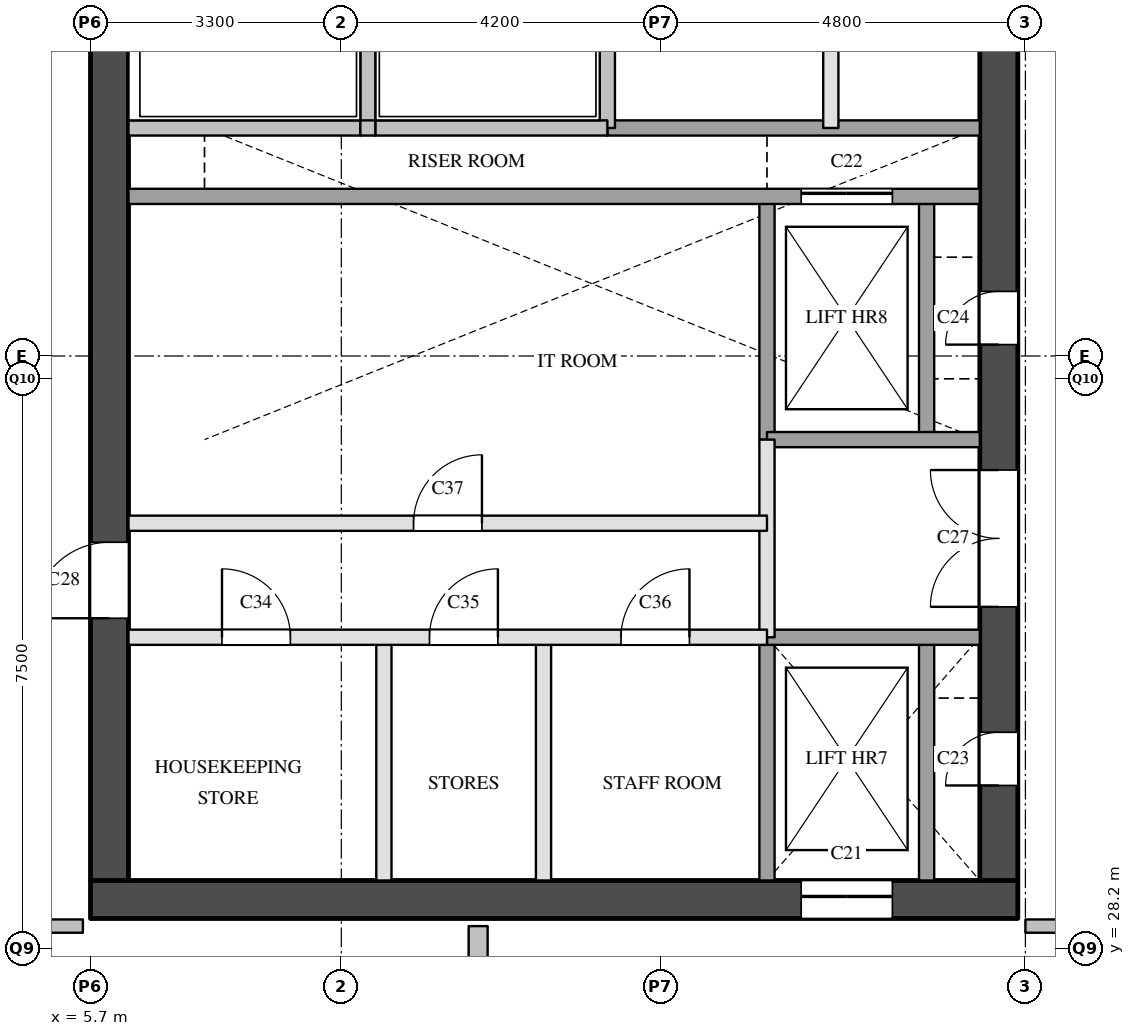
"""IFC4 building model, lengths in metres.
Left out: names, types, materials, properties, quantities, classifications, styles, units other than length and angle.
Written with IfcOpenShell. Run it as: python <this file> out.ifc"""

import sys

from ifc_helpers import new_model, si_unit, direction, frame, frame_2d, origin, place, context, subcontext, project, spatial, rectangle, extrude, element, fill, save


model = new_model("IFC4")
c1 = context("Model", 3, precision=1e-05, world=origin(), true_north=direction((0.0, 1.0)))
c2 = subcontext(c1, "Body", "Model", "MODEL_VIEW")
j1 = project(units=[si_unit("LENGTHUNIT", "METRE"), si_unit("PLANEANGLEUNIT", "RADIAN")], contexts=[c1])
p1 = place(None, origin())
s1 = spatial("IfcSite", under=j1, at=p1, CompositionType="ELEMENT")
p2 = place(p1, origin())
s2 = spatial("IfcBuilding", under=s1, at=p2, CompositionType="ELEMENT")
p3 = place(p2, frame((0.0, 0.0, 162.2)))
s3 = spatial("IfcBuildingStorey", under=s2, at=p3, CompositionType="ELEMENT", Elevation=162.2)
p4 = place(p3, frame((5.7, 28.85, 0.0), z_axis=(0.0, 0.0, 1.0), x_axis=(1.0, 0.0, 0.0)))
e1 = element("IfcWall", 1, at=p4, inside=s3, PredefinedType="SHEAR", context=c2, shape_type="SweptSolid", body=[
    extrude(rectangle(XDim=12.2, YDim=0.5, at=frame_2d((6.1, 0.0))), origin(), (0.0, 0.0, 1.0), 3.6),
])
p5 = place(p4, frame((9.35, 0.0, 0.0)))
e2 = element("IfcOpeningElement", 2, at=p5, cuts=e1, PredefinedType="OPENING", context=c2, shape_type="SweptSolid", body=[
    extrude(rectangle(XDim=1.2, YDim=2.1, at=frame_2d((0.6, 1.05))), frame((0.0, 0.26, 0.0), z_axis=(0.0, -1.0, 0.0), x_axis=(1.0, 0.0, 0.0)), (0.0, 0.0, 1.0), 0.52),
])
p6 = place(p3, frame((5.95, 29.1, 0.0), z_axis=(0.0, 0.0, 1.0), x_axis=(0.0, 1.0, 0.0)))
e3 = element("IfcWall", 3, at=p6, inside=s3, PredefinedType="SHEAR", context=c2, shape_type="SweptSolid", body=[
    extrude(rectangle(XDim=20.3, YDim=0.5, at=frame_2d((10.15, 0.0))), origin(), (0.0, 0.0, 1.0), 3.6),
])
p7 = place(p6, frame((3.45, 0.0, 0.0)))
e4 = element("IfcOpeningElement", 4, at=p7, cuts=e3, PredefinedType="OPENING", context=c2, shape_type="SweptSolid", body=[
    extrude(rectangle(XDim=1.0, YDim=2.1, at=frame_2d((0.5, 1.05))), frame((0.0, 0.26, 0.0), z_axis=(0.0, -1.0, 0.0), x_axis=(1.0, 0.0, 0.0)), (0.0, 0.0, 1.0), 0.52),
])
p8 = place(p6, frame((16.4, 0.0, 0.0)))
e5 = element("IfcOpeningElement", 5, at=p8, cuts=e3, PredefinedType="OPENING", context=c2, shape_type="SweptSolid", body=[
    extrude(rectangle(XDim=1.0, YDim=2.1, at=frame_2d((0.5, 1.05))), frame((0.0, 0.26, 0.0), z_axis=(0.0, -1.0, 0.0), x_axis=(1.0, 0.0, 0.0)), (0.0, 0.0, 1.0), 0.52),
])
p9 = place(p3, frame((17.65, 29.1, 0.0), z_axis=(0.0, 0.0, 1.0), x_axis=(0.0, 1.0, 0.0)))
e6 = element("IfcWall", 6, at=p9, inside=s3, PredefinedType="SHEAR", context=c2, shape_type="SweptSolid", body=[
    extrude(rectangle(XDim=20.3, YDim=0.5, at=frame_2d((10.15, 0.0))), origin(), (0.0, 0.0, 1.0), 3.6),
])
p10 = place(p9, frame((1.25, 0.0, 0.0)))
e7 = element("IfcOpeningElement", 7, at=p10, cuts=e6, PredefinedType="OPENING", context=c2, shape_type="SweptSolid", body=[
    extrude(rectangle(XDim=0.7, YDim=2.1, at=frame_2d((0.35, 1.05))), frame((0.0, 0.26, 0.0), z_axis=(0.0, -1.0, 0.0), x_axis=(1.0, 0.0, 0.0)), (0.0, 0.0, 1.0), 0.52),
])
p11 = place(p9, frame((7.05, 0.0, 0.0)))
e8 = element("IfcOpeningElement", 8, at=p11, cuts=e6, PredefinedType="OPENING", context=c2, shape_type="SweptSolid", body=[
    extrude(rectangle(XDim=0.7, YDim=2.1, at=frame_2d((0.35, 1.05))), frame((0.0, 0.26, 0.0), z_axis=(0.0, -1.0, 0.0), x_axis=(1.0, 0.0, 0.0)), (0.0, 0.0, 1.0), 0.52),
])
p12 = place(p9, frame((3.6, 0.0, 0.0)))
e9 = element("IfcOpeningElement", 9, at=p12, cuts=e6, PredefinedType="OPENING", context=c2, shape_type="SweptSolid", body=[
    extrude(rectangle(XDim=1.8, YDim=2.1, at=frame_2d((0.9, 1.05))), frame((0.0, 0.26, 0.0), z_axis=(0.0, -1.0, 0.0), x_axis=(1.0, 0.0, 0.0)), (0.0, 0.0, 1.0), 0.52),
])
p13 = place(p3, frame((9.35, 39.0, 0.0), z_axis=(0.0, 0.0, 1.0), x_axis=(0.0, 1.0, 0.0)))
e10 = element("IfcWall", 10, at=p13, inside=s3, PredefinedType="SOLIDWALL", context=c2, shape_type="SweptSolid", body=[
    extrude(rectangle(XDim=1.9, YDim=0.2, at=frame_2d((0.95, 0.0))), origin(), (0.0, 0.0, 1.0), 3.6),
])
for number, where, z_axis, x_axis in (
    (11, (9.56, 29.1, 0.0), (0.0, 0.0, 1.0), (0.0, 1.0, 0.0)),
    (12, (11.66, 29.1, 0.0), (0.0, 0.0, 1.0), (0.0, 1.0, 0.0)),
):
    element("IfcWall", number, at=place(p3, frame(where, z_axis=z_axis, x_axis=x_axis)), inside=s3, PredefinedType="PARTITIONING", context=c2, shape_type="SweptSolid", body=[
        extrude(rectangle(XDim=3.2, YDim=0.2, at=frame_2d((1.6, 0.0))), origin(), (0.0, 0.0, 1.0), 3.6),
    ])
p14 = place(p3, frame((12.5, 39.0, 0.0), z_axis=(0.0, 0.0, 1.0), x_axis=(0.0, 1.0, 0.0)))
e13 = element("IfcWall", 13, at=p14, inside=s3, PredefinedType="SOLIDWALL", context=c2, shape_type="SweptSolid", body=[
    extrude(rectangle(XDim=1.9, YDim=0.2, at=frame_2d((0.95, 0.0))), origin(), (0.0, 0.0, 1.0), 3.6),
])
p15 = place(p3, frame((14.6, 32.3, 0.0), z_axis=(0.0, 0.0, 1.0), x_axis=(0.0, 1.0, 0.0)))
e14 = element("IfcWall", 14, at=p15, inside=s3, PredefinedType="PARTITIONING", context=c2, shape_type="SweptSolid", body=[
    extrude(rectangle(XDim=2.6, YDim=0.2, at=frame_2d((1.3, 0.0))), origin(), (0.0, 0.0, 1.0), 3.6),
])
p16 = place(p3, frame((14.6, 29.1, 0.0), z_axis=(0.0, 0.0, 1.0), x_axis=(0.0, 1.0, 0.0)))
e15 = element("IfcWall", 15, at=p16, inside=s3, PredefinedType="SOLIDWALL", context=c2, shape_type="SweptSolid", body=[
    extrude(rectangle(XDim=3.2, YDim=0.2, at=frame_2d((1.6, 0.0))), origin(), (0.0, 0.0, 1.0), 3.6),
])
p17 = place(p3, frame((14.6, 34.9, 0.0), z_axis=(0.0, 0.0, 1.0), x_axis=(0.0, 1.0, 0.0)))
e16 = element("IfcWall", 16, at=p17, inside=s3, PredefinedType="SOLIDWALL", context=c2, shape_type="SweptSolid", body=[
    extrude(rectangle(XDim=3.2, YDim=0.2, at=frame_2d((1.6, 0.0))), origin(), (0.0, 0.0, 1.0), 3.6),
])
p18 = place(p3, frame((15.44, 39.0, 0.0), z_axis=(0.0, 0.0, 1.0), x_axis=(0.0, 1.0, 0.0)))
e17 = element("IfcWall", 17, at=p18, inside=s3, PredefinedType="PARTITIONING", context=c2, shape_type="SweptSolid", body=[
    extrude(rectangle(XDim=6.2, YDim=0.2, at=frame_2d((3.1, 0.0))), origin(), (0.0, 0.0, 1.0), 3.6),
])
p19 = place(p3, frame((16.7, 29.1, 0.0), z_axis=(0.0, 0.0, 1.0), x_axis=(0.0, 1.0, 0.0)))
e18 = element("IfcWall", 18, at=p19, inside=s3, PredefinedType="SOLIDWALL", context=c2, shape_type="SweptSolid", body=[
    extrude(rectangle(XDim=3.2, YDim=0.2, at=frame_2d((1.6, 0.0))), origin(), (0.0, 0.0, 1.0), 3.6),
])
p20 = place(p3, frame((16.7, 34.9, 0.0), z_axis=(0.0, 0.0, 1.0), x_axis=(0.0, 1.0, 0.0)))
e19 = element("IfcWall", 19, at=p20, inside=s3, PredefinedType="SOLIDWALL", context=c2, shape_type="SweptSolid", body=[
    extrude(rectangle(XDim=3.2, YDim=0.2, at=frame_2d((1.6, 0.0))), origin(), (0.0, 0.0, 1.0), 3.6),
])
p21 = place(p3, frame((6.2, 32.3, 0.0), z_axis=(0.0, 0.0, 1.0), x_axis=(1.0, 0.0, 0.0)))
e20 = element("IfcWall", 20, at=p21, inside=s3, PredefinedType="PARTITIONING", context=c2, shape_type="SweptSolid", body=[
    extrude(rectangle(XDim=8.4, YDim=0.2, at=frame_2d((4.2, 0.0))), origin(), (0.0, 0.0, 1.0), 3.6),
])
p22 = place(p21, frame((1.23, 0.0, 0.0)))
e21 = element("IfcOpeningElement", 21, at=p22, cuts=e20, PredefinedType="OPENING", context=c2, shape_type="SweptSolid", body=[
    extrude(rectangle(XDim=0.9, YDim=2.1, at=frame_2d((0.45, 1.05))), frame((0.0, 0.11, 0.0), z_axis=(0.0, -1.0, 0.0), x_axis=(1.0, 0.0, 0.0)), (0.0, 0.0, 1.0), 0.22),
])
p23 = place(p21, frame((3.96, 0.0, 0.0)))
e22 = element("IfcOpeningElement", 22, at=p23, cuts=e20, PredefinedType="OPENING", context=c2, shape_type="SweptSolid", body=[
    extrude(rectangle(XDim=0.9, YDim=2.1, at=frame_2d((0.45, 1.05))), frame((0.0, 0.11, 0.0), z_axis=(0.0, -1.0, 0.0), x_axis=(1.0, 0.0, 0.0)), (0.0, 0.0, 1.0), 0.22),
])
p24 = place(p21, frame((6.48, 0.0, 0.0)))
e23 = element("IfcOpeningElement", 23, at=p24, cuts=e20, PredefinedType="OPENING", context=c2, shape_type="SweptSolid", body=[
    extrude(rectangle(XDim=0.9, YDim=2.1, at=frame_2d((0.45, 1.05))), frame((0.0, 0.11, 0.0), z_axis=(0.0, -1.0, 0.0), x_axis=(1.0, 0.0, 0.0)), (0.0, 0.0, 1.0), 0.22),
])
p25 = place(p3, frame((14.6, 32.3, 0.0), z_axis=(0.0, 0.0, 1.0), x_axis=(1.0, 0.0, 0.0)))
e24 = element("IfcWall", 24, at=p25, inside=s3, PredefinedType="SOLIDWALL", context=c2, shape_type="SweptSolid", body=[
    extrude(rectangle(XDim=2.8, YDim=0.2, at=frame_2d((1.4, 0.0))), origin(), (0.0, 0.0, 1.0), 3.6),
])
p26 = place(p3, frame((6.2, 33.8, 0.0), z_axis=(0.0, 0.0, 1.0), x_axis=(1.0, 0.0, 0.0)))
e25 = element("IfcWall", 25, at=p26, inside=s3, PredefinedType="PARTITIONING", context=c2, shape_type="SweptSolid", body=[
    extrude(rectangle(XDim=8.4, YDim=0.2, at=frame_2d((4.2, 0.0))), origin(), (0.0, 0.0, 1.0), 3.6),
])
p27 = place(p26, frame((3.75, 0.0, 0.0)))
e26 = element("IfcOpeningElement", 26, at=p27, cuts=e25, PredefinedType="OPENING", context=c2, shape_type="SweptSolid", body=[
    extrude(rectangle(XDim=0.9, YDim=2.1, at=frame_2d((0.45, 1.05))), frame((0.0, 0.11, 0.0), z_axis=(0.0, -1.0, 0.0), x_axis=(1.0, 0.0, 0.0)), (0.0, 0.0, 1.0), 0.22),
])
p28 = place(p3, frame((14.6, 34.9, 0.0), z_axis=(0.0, 0.0, 1.0), x_axis=(1.0, 0.0, 0.0)))
e27 = element("IfcWall", 27, at=p28, inside=s3, PredefinedType="SOLIDWALL", context=c2, shape_type="SweptSolid", body=[
    extrude(rectangle(XDim=2.8, YDim=0.2, at=frame_2d((1.4, 0.0))), origin(), (0.0, 0.0, 1.0), 3.6),
])
p29 = place(p3, frame((6.2, 38.1, 0.0), z_axis=(0.0, 0.0, 1.0), x_axis=(1.0, 0.0, 0.0)))
e28 = element("IfcWall", 28, at=p29, inside=s3, PredefinedType="SOLIDWALL", context=c2, shape_type="SweptSolid", body=[
    extrude(rectangle(XDim=11.2, YDim=0.2, at=frame_2d((5.6, 0.0))), origin(), (0.0, 0.0, 1.0), 3.6),
])
p30 = place(p29, frame((8.85, 0.0, 0.0)))
e29 = element("IfcOpeningElement", 29, at=p30, cuts=e28, PredefinedType="OPENING", context=c2, shape_type="SweptSolid", body=[
    extrude(rectangle(XDim=1.2, YDim=2.1, at=frame_2d((0.6, 1.05))), frame((0.0, 0.11, 0.0), z_axis=(0.0, -1.0, 0.0), x_axis=(1.0, 0.0, 0.0)), (0.0, 0.0, 1.0), 0.22),
])
p31 = place(p3, frame((12.5, 39.0, 0.0), z_axis=(0.0, 0.0, 1.0), x_axis=(1.0, 0.0, 0.0)))
e30 = element("IfcWall", 30, at=p31, inside=s3, PredefinedType="SOLIDWALL", context=c2, shape_type="SweptSolid", body=[
    extrude(rectangle(XDim=4.9, YDim=0.2, at=frame_2d((2.45, 0.0))), origin(), (0.0, 0.0, 1.0), 3.6),
])
p32 = place(p3, frame((6.2, 39.0, 0.0), z_axis=(0.0, 0.0, 1.0), x_axis=(1.0, 0.0, 0.0)))
e31 = element("IfcWall", 31, at=p32, inside=s3, PredefinedType="SOLIDWALL", context=c2, shape_type="SweptSolid", body=[
    extrude(rectangle(XDim=3.05, YDim=0.2, at=frame_2d((1.525, 0.0))), origin(), (0.0, 0.0, 1.0), 3.6),
])
p33 = place(p3, frame((9.25, 39.0, 0.0), z_axis=(0.0, 0.0, 1.0), x_axis=(1.0, 0.0, 0.0)))
e32 = element("IfcWall", 32, at=p33, inside=s3, PredefinedType="SOLIDWALL", context=c2, shape_type="SweptSolid", body=[
    extrude(rectangle(XDim=0.2, YDim=0.2, at=frame_2d((0.1, 0.0))), origin(), (0.0, 0.0, 1.0), 3.6),
])
p34 = place(p3, frame((9.45, 39.0, 0.0), z_axis=(0.0, 0.0, 1.0), x_axis=(1.0, 0.0, 0.0)))
e33 = element("IfcWall", 33, at=p34, inside=s3, PredefinedType="SOLIDWALL", context=c2, shape_type="SweptSolid", body=[
    extrude(rectangle(XDim=3.05, YDim=0.2, at=frame_2d((1.525, 0.0))), origin(), (0.0, 0.0, 1.0), 3.6),
])
for number, where, z_axis, x_axis in (
    (34, (4.1, 28.5, 0.0), (0.0, 0.0, 1.0), (1.0, 0.0, 0.0)),
    (35, (18.0, 28.5, 0.0), (0.0, 0.0, 1.0), (1.0, 0.0, 0.0)),
):
    element("IfcWall", number, at=place(p3, frame(where, z_axis=z_axis, x_axis=x_axis)), inside=s3, PredefinedType="PARTITIONING", context=c2, shape_type="SweptSolid", body=[
        extrude(rectangle(XDim=1.5, YDim=0.175, at=frame_2d((0.75, 0.0))), origin(), (0.0, 0.0, 1.0), 3.6),
    ])
p35 = place(p3, frame((10.8, 27.0, 0.0), z_axis=(0.0, 0.0, 1.0), x_axis=(0.0, 1.0, 0.0)))
e36 = element("IfcWall", 36, at=p35, inside=s3, PredefinedType="PARTITIONING", context=c2, shape_type="SweptSolid", body=[
    extrude(rectangle(XDim=1.5, YDim=0.25, at=frame_2d((0.75, 0.0))), origin(), (0.0, 0.0, 1.0), 2.6),
])
p36 = place(p5, origin())
e37 = element("IfcDoor", 37, at=p36, inside=s3, OperationType="SLIDING_TO_LEFT", PredefinedType="DOOR", context=c2, shape_type="SweptSolid", body=[
    extrude(rectangle(XDim=1.2, YDim=2.1, at=frame_2d((0.6, 1.05))), frame((0.0, 0.025, 0.0), z_axis=(0.0, -1.0, 0.0), x_axis=(1.0, 0.0, 0.0)), (0.0, 0.0, 1.0), 0.05),
])
fill(e2, e37)
p37 = place(p30, origin())
e38 = element("IfcDoor", 38, at=p37, inside=s3, OperationType="SLIDING_TO_LEFT", PredefinedType="DOOR", context=c2, shape_type="SweptSolid", body=[
    extrude(rectangle(XDim=1.2, YDim=2.1, at=frame_2d((0.6, 1.05))), frame((0.0, 0.025, 0.0), z_axis=(0.0, -1.0, 0.0), x_axis=(1.0, 0.0, 0.0)), (0.0, 0.0, 1.0), 0.05),
])
fill(e29, e38)
p38 = place(p10, origin())
e39 = element("IfcDoor", 39, at=p38, inside=s3, OperationType="SINGLE_SWING_LEFT", PredefinedType="DOOR", context=c2, shape_type="SweptSolid", body=[
    extrude(rectangle(XDim=0.7, YDim=2.1, at=frame_2d((0.35, 1.05))), frame((0.0, 0.025, 0.0), z_axis=(0.0, -1.0, 0.0), x_axis=(1.0, 0.0, 0.0)), (0.0, 0.0, 1.0), 0.05),
])
fill(e7, e39)
p39 = place(p11, origin())
e40 = element("IfcDoor", 40, at=p39, inside=s3, OperationType="SINGLE_SWING_LEFT", PredefinedType="DOOR", context=c2, shape_type="SweptSolid", body=[
    extrude(rectangle(XDim=0.7, YDim=2.1, at=frame_2d((0.35, 1.05))), frame((0.0, 0.025, 0.0), z_axis=(0.0, -1.0, 0.0), x_axis=(1.0, 0.0, 0.0)), (0.0, 0.0, 1.0), 0.05),
])
fill(e8, e40)
p40 = place(p12, origin())
e41 = element("IfcDoor", 41, at=p40, inside=s3, OperationType="DOUBLE_DOOR_SINGLE_SWING", PredefinedType="DOOR", context=c2, shape_type="SweptSolid", body=[
    extrude(rectangle(XDim=1.8, YDim=2.1, at=frame_2d((0.9, 1.05))), frame((0.0, 0.025, 0.0), z_axis=(0.0, -1.0, 0.0), x_axis=(1.0, 0.0, 0.0)), (0.0, 0.0, 1.0), 0.05),
])
fill(e9, e41)
p41 = place(p7, origin())
e42 = element("IfcDoor", 42, at=p41, inside=s3, OperationType="SINGLE_SWING_LEFT", PredefinedType="DOOR", context=c2, shape_type="SweptSolid", body=[
    extrude(rectangle(XDim=1.0, YDim=2.1, at=frame_2d((0.5, 1.05))), frame((0.0, 0.025, 0.0), z_axis=(0.0, -1.0, 0.0), x_axis=(1.0, 0.0, 0.0)), (0.0, 0.0, 1.0), 0.05),
])
fill(e4, e42)
p42 = place(p22, origin())
e43 = element("IfcDoor", 43, at=p42, inside=s3, OperationType="SINGLE_SWING_LEFT", PredefinedType="DOOR", context=c2, shape_type="SweptSolid", body=[
    extrude(rectangle(XDim=0.9, YDim=2.1, at=frame_2d((0.45, 1.05))), frame((0.0, 0.025, 0.0), z_axis=(0.0, -1.0, 0.0), x_axis=(1.0, 0.0, 0.0)), (0.0, 0.0, 1.0), 0.05),
])
fill(e21, e43)
p43 = place(p23, origin())
e44 = element("IfcDoor", 44, at=p43, inside=s3, OperationType="SINGLE_SWING_RIGHT", PredefinedType="DOOR", context=c2, shape_type="SweptSolid", body=[
    extrude(rectangle(XDim=0.9, YDim=2.1, at=frame_2d((0.45, 1.05))), frame((0.0, 0.025, 0.0), z_axis=(0.0, -1.0, 0.0), x_axis=(1.0, 0.0, 0.0)), (0.0, 0.0, 1.0), 0.05),
])
fill(e22, e44)
p44 = place(p24, origin())
e45 = element("IfcDoor", 45, at=p44, inside=s3, OperationType="SINGLE_SWING_RIGHT", PredefinedType="DOOR", context=c2, shape_type="SweptSolid", body=[
    extrude(rectangle(XDim=0.9, YDim=2.1, at=frame_2d((0.45, 1.05))), frame((0.0, 0.025, 0.0), z_axis=(0.0, -1.0, 0.0), x_axis=(1.0, 0.0, 0.0)), (0.0, 0.0, 1.0), 0.05),
])
fill(e23, e45)
p45 = place(p27, origin())
e46 = element("IfcDoor", 46, at=p45, inside=s3, OperationType="SINGLE_SWING_RIGHT", PredefinedType="DOOR", context=c2, shape_type="SweptSolid", body=[
    extrude(rectangle(XDim=0.9, YDim=2.1, at=frame_2d((0.45, 1.05))), frame((0.0, 0.025, 0.0), z_axis=(0.0, -1.0, 0.0), x_axis=(1.0, 0.0, 0.0)), (0.0, 0.0, 1.0), 0.05),
])
fill(e26, e46)
save(model, sys.argv[1])
